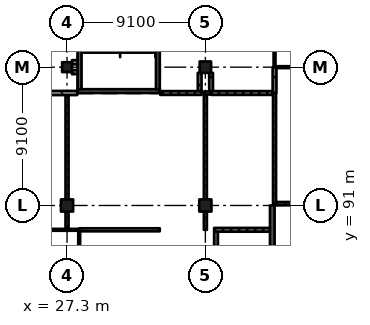
"""IFC4 building model, lengths in metres.
Left out: names, types, materials, properties, quantities, classifications, styles, units other than length and angle.
Written with IfcOpenShell. Run it as: python <this file> out.ifc"""

import sys

from ifc_helpers import new_model, si_unit, direction, frame, frame_2d, origin, origin_2d, place, context, subcontext, project, spatial, rectangle, extrude, element, fill, save


model = new_model("IFC4")
c1 = context("Model", 3, precision=1e-05, world=origin(), true_north=direction((0.0, 1.0)))
c2 = subcontext(c1, "Body", "Model", "MODEL_VIEW")
j1 = project(units=[si_unit("LENGTHUNIT", "METRE"), si_unit("PLANEANGLEUNIT", "RADIAN")], contexts=[c1])
p1 = place(None, origin())
s1 = spatial("IfcSite", under=j1, at=p1, CompositionType="ELEMENT")
p2 = place(p1, origin())
s2 = spatial("IfcBuilding", under=s1, at=p2, CompositionType="ELEMENT")
p3 = place(p2, frame((0.0, 0.0, 10.92)))
s3 = spatial("IfcBuildingStorey", under=s2, at=p3, CompositionType="ELEMENT", Elevation=10.92)
p4 = place(p3, frame((27.3, 91.0, 0.0), z_axis=(0.0, 0.0, 1.0), x_axis=(1.0, 0.0, 0.0)))
e1 = element("IfcColumn", 1, at=p4, inside=s3, PredefinedType="COLUMN", context=c2, shape_type="SweptSolid", body=[
    extrude(rectangle(XDim=0.8, YDim=0.8, at=origin_2d()), origin(), (0.0, 0.0, 1.0), 4.55),
])
p5 = place(p3, frame((27.3, 100.1, 0.0), z_axis=(0.0, 0.0, 1.0), x_axis=(1.0, 0.0, 0.0)))
e2 = element("IfcColumn", 2, at=p5, inside=s3, PredefinedType="COLUMN", context=c2, shape_type="SweptSolid", body=[
    extrude(rectangle(XDim=0.65, YDim=0.65, at=origin_2d()), origin(), (0.0, 0.0, 1.0), 4.55),
])
p6 = place(p3, frame((36.4, 91.0, 0.0), z_axis=(0.0, 0.0, 1.0), x_axis=(1.0, 0.0, 0.0)))
e3 = element("IfcColumn", 3, at=p6, inside=s3, PredefinedType="COLUMN", context=c2, shape_type="SweptSolid", body=[
    extrude(rectangle(XDim=0.8, YDim=0.8, at=origin_2d()), origin(), (0.0, 0.0, 1.0), 4.55),
])
p7 = place(p3, frame((36.4, 100.1, 0.0), z_axis=(0.0, 0.0, 1.0), x_axis=(1.0, 0.0, 0.0)))
e4 = element("IfcColumn", 4, at=p7, inside=s3, PredefinedType="COLUMN", context=c2, shape_type="SweptSolid", body=[
    extrude(rectangle(XDim=0.75, YDim=0.75, at=origin_2d()), origin(), (0.0, 0.0, 1.0), 4.55),
])
p8 = place(p3, frame((40.8, 68.25, 0.0), z_axis=(0.0, 0.0, 1.0), x_axis=(0.0, 1.0, 0.0)))
e5 = element("IfcWall", 5, at=p8, inside=s3, PredefinedType="SHEAR", context=c2, shape_type="SweptSolid", body=[
    extrude(rectangle(XDim=22.75, YDim=0.3, at=frame_2d((11.375, 0.0))), origin(), (0.0, 0.0, 1.0), 4.55),
])
p9 = place(p3, frame((33.4, 98.525, 0.0), z_axis=(0.0, 0.0, 1.0), x_axis=(-1.0, 0.0, 0.0)))
e6 = element("IfcWall", 6, at=p9, inside=s3, PredefinedType="SHEAR", context=c2, shape_type="SweptSolid", body=[
    extrude(rectangle(XDim=5.4, YDim=0.25, at=frame_2d((2.7, 0.0))), origin(), (0.0, 0.0, 1.0), 4.55),
])
p10 = place(p9, frame((1.5, 0.0, 0.0)))
e7 = element("IfcOpeningElement", 7, at=p10, cuts=e6, PredefinedType="OPENING", context=c2, shape_type="SweptSolid", body=[
    extrude(rectangle(XDim=2.4, YDim=2.1, at=frame_2d((1.2, 1.05))), frame((0.0, 0.135, 0.0), z_axis=(0.0, -1.0, 0.0), x_axis=(1.0, 0.0, 0.0)), (0.0, 0.0, 1.0), 0.27),
])
for number, where, z_axis, x_axis in (
    (8, (28.125, 108.25, 0.0), (0.0, 0.0, 1.0), (0.0, -1.0, 0.0)),
    (9, (33.275, 108.25, 0.0), (0.0, 0.0, 1.0), (0.0, -1.0, 0.0)),
):
    element("IfcWall", number, at=place(p3, frame(where, z_axis=z_axis, x_axis=x_axis)), inside=s3, PredefinedType="SHEAR", context=c2, shape_type="SweptSolid", body=[
        extrude(rectangle(XDim=9.6, YDim=0.25, at=frame_2d((4.8, 0.0))), origin(), (0.0, 0.0, 1.0), 4.55),
    ])
p11 = place(p3, frame((24.33, 98.4, 0.0), z_axis=(0.0, 0.0, 1.0), x_axis=(1.0, 0.0, 0.0)))
e10 = element("IfcWall", 10, at=p11, inside=s3, PredefinedType="SOLIDWALL", context=c2, shape_type="SweptSolid", body=[
    extrude(rectangle(XDim=3.64, YDim=0.275, at=frame_2d((1.82, 0.0))), origin(), (0.0, 0.0, 1.0), 4.25),
])
p12 = place(p11, frame((0.85, 0.0, 0.0)))
e11 = element("IfcOpeningElement", 11, at=p12, cuts=e10, PredefinedType="OPENING", context=c2, shape_type="SweptSolid", body=[
    extrude(rectangle(XDim=1.2, YDim=2.4, at=frame_2d((0.6, 1.2))), frame((0.0, 0.147, 0.0), z_axis=(0.0, -1.0, 0.0), x_axis=(1.0, 0.0, 0.0)), (0.0, 0.0, 1.0), 0.295),
])
p13 = place(p3, frame((24.3, 89.4, 0.0), z_axis=(0.0, 0.0, 1.0), x_axis=(1.0, 0.0, 0.0)))
e12 = element("IfcWall", 12, at=p13, inside=s3, PredefinedType="PARTITIONING", context=c2, shape_type="SweptSolid", body=[
    extrude(rectangle(XDim=3.8, YDim=0.125, at=frame_2d((1.9, 0.0))), origin(), (0.0, 0.0, 1.0), 4.25),
])
p14 = place(p13, frame((1.05, 0.0, 0.0)))
e13 = element("IfcOpeningElement", 13, at=p14, cuts=e12, PredefinedType="OPENING", context=c2, shape_type="SweptSolid", body=[
    extrude(rectangle(XDim=0.9, YDim=2.1, at=frame_2d((0.45, 1.05))), frame((0.0, 0.073, 0.0), z_axis=(0.0, -1.0, 0.0), x_axis=(1.0, 0.0, 0.0)), (0.0, 0.0, 1.0), 0.145),
])
p15 = place(p3, frame((27.3, 90.6, 0.0), z_axis=(0.0, 0.0, 1.0), x_axis=(0.0, -1.0, 0.0)))
e14 = element("IfcWall", 14, at=p15, inside=s3, PredefinedType="PARTITIONING", context=c2, shape_type="SweptSolid", body=[
    extrude(rectangle(XDim=1.138, YDim=0.2, at=frame_2d((0.569, 0.0))), origin(), (0.0, 0.0, 1.0), 3.55),
])
p16 = place(p3, frame((27.3, 98.262, 0.0), z_axis=(0.0, 0.0, 1.0), x_axis=(0.0, -1.0, 0.0)))
e15 = element("IfcWall", 15, at=p16, inside=s3, PredefinedType="PARTITIONING", context=c2, shape_type="SweptSolid", body=[
    extrude(rectangle(XDim=6.863, YDim=0.2, at=frame_2d((3.431, 0.0))), origin(), (0.0, 0.0, 1.0), 3.55),
])
p17 = place(p16, frame((0.85, 0.0, 0.0)))
e16 = element("IfcOpeningElement", 16, at=p17, cuts=e15, PredefinedType="OPENING", context=c2, shape_type="SweptSolid", body=[
    extrude(rectangle(XDim=1.8, YDim=2.4, at=frame_2d((0.9, 1.2))), frame((0.0, 0.11, 0.0), z_axis=(0.0, -1.0, 0.0), x_axis=(1.0, 0.0, 0.0)), (0.0, 0.0, 1.0), 0.22),
])
p18 = place(p16, frame((4.25, 0.0, 0.0)))
e17 = element("IfcOpeningElement", 17, at=p18, cuts=e15, PredefinedType="OPENING", context=c2, shape_type="SweptSolid", body=[
    extrude(rectangle(XDim=1.8, YDim=2.4, at=frame_2d((0.9, 1.2))), frame((0.0, 0.11, 0.0), z_axis=(0.0, -1.0, 0.0), x_axis=(1.0, 0.0, 0.0)), (0.0, 0.0, 1.0), 0.22),
])
for number, where, z_axis, x_axis in (
    (18, (27.625, 99.775, 0.0), (0.0, 0.0, 1.0), (1.0, 0.0, 0.0)),
    (19, (27.97, 100.425, 0.0), (0.0, 0.0, 1.0), (-1.0, 0.0, 0.0)),
):
    element("IfcWall", number, at=place(p3, frame(where, z_axis=z_axis, x_axis=x_axis)), inside=s3, PredefinedType="SOLIDWALL", context=c2, shape_type="SweptSolid", body=[
        extrude(rectangle(XDim=0.345, YDim=0.275, at=frame_2d((0.172, 0.0))), origin(), (0.0, 0.0, 1.0), 4.25),
    ])
p19 = place(p3, frame((28.1, 89.3, 0.0), z_axis=(0.0, 0.0, 1.0), x_axis=(0.0, -1.0, 0.0)))
e20 = element("IfcWall", 20, at=p19, inside=s3, PredefinedType="PARTITIONING", context=c2, shape_type="SweptSolid", body=[
    extrude(rectangle(XDim=2.87, YDim=0.125, at=frame_2d((1.435, 0.0))), origin(), (0.0, 0.0, 1.0), 4.25),
])
p20 = place(p3, frame((33.4, 89.4, 0.0), z_axis=(0.0, 0.0, 1.0), x_axis=(-1.0, 0.0, 0.0)))
e21 = element("IfcWall", 21, at=p20, inside=s3, PredefinedType="PARTITIONING", context=c2, shape_type="SweptSolid", body=[
    extrude(rectangle(XDim=5.3, YDim=0.2, at=frame_2d((2.65, 0.0))), origin(), (0.0, 0.0, 1.0), 4.25),
])
p21 = place(p20, frame((1.75, 0.0, 0.0)))
e22 = element("IfcOpeningElement", 22, at=p21, cuts=e21, PredefinedType="OPENING", context=c2, shape_type="SweptSolid", body=[
    extrude(rectangle(XDim=1.8, YDim=2.4, at=frame_2d((0.9, 1.2))), frame((0.0, 0.11, 0.0), z_axis=(0.0, -1.0, 0.0), x_axis=(1.0, 0.0, 0.0)), (0.0, 0.0, 1.0), 0.22),
])
p22 = place(p3, frame((33.43, 98.4, 0.0), z_axis=(0.0, 0.0, 1.0), x_axis=(1.0, 0.0, 0.0)))
e23 = element("IfcWall", 23, at=p22, inside=s3, PredefinedType="SOLIDWALL", context=c2, shape_type="SweptSolid", body=[
    extrude(rectangle(XDim=2.72, YDim=0.25, at=frame_2d((1.36, 0.0))), origin(), (0.0, 0.0, 1.0), 4.25),
])
p23 = place(p3, frame((36.025, 98.525, 0.0), z_axis=(0.0, 0.0, 1.0), x_axis=(0.0, 1.0, 0.0)))
e24 = element("IfcWall", 24, at=p23, inside=s3, PredefinedType="SOLIDWALL", context=c2, shape_type="SweptSolid", body=[
    extrude(rectangle(XDim=1.2, YDim=0.25, at=frame_2d((0.6, 0.0))), origin(), (0.0, 0.0, 1.0), 4.25),
])
p24 = place(p3, frame((36.4, 90.6, 0.0), z_axis=(0.0, 0.0, 1.0), x_axis=(0.0, -1.0, 0.0)))
e25 = element("IfcWall", 25, at=p24, inside=s3, PredefinedType="PARTITIONING", context=c2, shape_type="SweptSolid", body=[
    extrude(rectangle(XDim=1.2, YDim=0.2, at=frame_2d((0.6, 0.0))), origin(), (0.0, 0.0, 1.0), 3.55),
])
p25 = place(p3, frame((36.4, 98.3, 0.0), z_axis=(0.0, 0.0, 1.0), x_axis=(0.0, -1.0, 0.0)))
e26 = element("IfcWall", 26, at=p25, inside=s3, PredefinedType="PARTITIONING", context=c2, shape_type="SweptSolid", body=[
    extrude(rectangle(XDim=6.9, YDim=0.2, at=frame_2d((3.45, 0.0))), origin(), (0.0, 0.0, 1.0), 3.55),
])
p26 = place(p25, frame((0.85, 0.0, 0.0)))
e27 = element("IfcOpeningElement", 27, at=p26, cuts=e26, PredefinedType="OPENING", context=c2, shape_type="SweptSolid", body=[
    extrude(rectangle(XDim=1.8, YDim=2.4, at=frame_2d((0.9, 1.2))), frame((0.0, 0.11, 0.0), z_axis=(0.0, -1.0, 0.0), x_axis=(1.0, 0.0, 0.0)), (0.0, 0.0, 1.0), 0.22),
])
p27 = place(p25, frame((4.25, 0.0, 0.0)))
e28 = element("IfcOpeningElement", 28, at=p27, cuts=e26, PredefinedType="OPENING", context=c2, shape_type="SweptSolid", body=[
    extrude(rectangle(XDim=1.8, YDim=2.4, at=frame_2d((0.9, 1.2))), frame((0.0, 0.11, 0.0), z_axis=(0.0, -1.0, 0.0), x_axis=(1.0, 0.0, 0.0)), (0.0, 0.0, 1.0), 0.22),
])
p28 = place(p3, frame((36.775, 98.4, 0.0), z_axis=(0.0, 0.0, 1.0), x_axis=(-1.0, 0.0, 0.0)))
e29 = element("IfcWall", 29, at=p28, inside=s3, PredefinedType="PARTITIONING", context=c2, shape_type="SweptSolid", body=[
    extrude(rectangle(XDim=0.475, YDim=0.2, at=frame_2d((0.237, 0.0))), origin(), (0.0, 0.0, 1.0), 4.25),
])
p29 = place(p3, frame((36.775, 98.4, 0.0), z_axis=(0.0, 0.0, 1.0), x_axis=(1.0, 0.0, 0.0)))
e30 = element("IfcWall", 30, at=p29, inside=s3, PredefinedType="SOLIDWALL", context=c2, shape_type="SweptSolid", body=[
    extrude(rectangle(XDim=4.05, YDim=0.25, at=frame_2d((2.025, 0.0))), origin(), (0.0, 0.0, 1.0), 4.25),
])
p30 = place(p29, frame((1.15, 0.0, 0.0)))
e31 = element("IfcOpeningElement", 31, at=p30, cuts=e30, PredefinedType="OPENING", context=c2, shape_type="SweptSolid", body=[
    extrude(rectangle(XDim=1.8, YDim=2.1, at=frame_2d((0.9, 1.05))), frame((0.0, 0.135, 0.0), z_axis=(0.0, -1.0, 0.0), x_axis=(1.0, 0.0, 0.0)), (0.0, 0.0, 1.0), 0.27),
])
p31 = place(p3, frame((36.775, 99.725, 0.0), z_axis=(0.0, 0.0, 1.0), x_axis=(0.0, -1.0, 0.0)))
e32 = element("IfcWall", 32, at=p31, inside=s3, PredefinedType="SOLIDWALL", context=c2, shape_type="SweptSolid", body=[
    extrude(rectangle(XDim=1.2, YDim=0.25, at=frame_2d((0.6, 0.0))), origin(), (0.0, 0.0, 1.0), 4.25),
])
p32 = place(p3, frame((37.1, 89.275, 0.0), z_axis=(0.0, 0.0, 1.0), x_axis=(0.0, -1.0, 0.0)))
e33 = element("IfcWall", 33, at=p32, inside=s3, PredefinedType="SOLIDWALL", context=c2, shape_type="SweptSolid", body=[
    extrude(rectangle(XDim=6.875, YDim=0.25, at=frame_2d((3.438, 0.0))), origin(), (0.0, 0.0, 1.0), 4.25),
])
p33 = place(p3, frame((40.65, 89.4, 0.0), z_axis=(0.0, 0.0, 1.0), x_axis=(-1.0, 0.0, 0.0)))
e34 = element("IfcWall", 34, at=p33, inside=s3, PredefinedType="SOLIDWALL", context=c2, shape_type="SweptSolid", body=[
    extrude(rectangle(XDim=3.675, YDim=0.25, at=frame_2d((1.837, 0.0))), origin(), (0.0, 0.0, 1.0), 4.25),
])
p34 = place(p33, frame((1.35, 0.0, 0.0)))
e35 = element("IfcOpeningElement", 35, at=p34, cuts=e34, PredefinedType="OPENING", context=c2, shape_type="SweptSolid", body=[
    extrude(rectangle(XDim=1.0, YDim=2.1, at=frame_2d((0.5, 1.05))), frame((0.0, 0.135, 0.0), z_axis=(0.0, -1.0, 0.0), x_axis=(1.0, 0.0, 0.0)), (0.0, 0.0, 1.0), 0.27),
])
p35 = place(p3, frame((40.95, 98.4, 0.0), z_axis=(0.0, 0.0, 1.0), x_axis=(0.0, -1.0, 0.0)))
e36 = element("IfcWall", 36, at=p35, inside=s3, PredefinedType="PARTITIONING", context=c2, shape_type="SweptSolid", body=[
    extrude(rectangle(XDim=7.37, YDim=0.2, at=frame_2d((3.685, 0.0))), origin(), (0.0, 0.0, 1.0), 4.25),
])
p36 = place(p35, frame((0.95, 0.0, 0.0)))
e37 = element("IfcOpeningElement", 37, at=p36, cuts=e36, PredefinedType="OPENING", context=c2, shape_type="SweptSolid", body=[
    extrude(rectangle(XDim=1.8, YDim=2.4, at=frame_2d((0.9, 1.2))), frame((0.0, 0.11, 0.0), z_axis=(0.0, -1.0, 0.0), x_axis=(1.0, 0.0, 0.0)), (0.0, 0.0, 1.0), 0.22),
])
p37 = place(p35, frame((4.65, 0.0, 0.0)))
e38 = element("IfcOpeningElement", 38, at=p37, cuts=e36, PredefinedType="OPENING", context=c2, shape_type="SweptSolid", body=[
    extrude(rectangle(XDim=1.8, YDim=2.4, at=frame_2d((0.9, 1.2))), frame((0.0, 0.11, 0.0), z_axis=(0.0, -1.0, 0.0), x_axis=(1.0, 0.0, 0.0)), (0.0, 0.0, 1.0), 0.22),
])
p38 = place(p3, frame((40.95, 100.1, 0.0), z_axis=(0.0, 0.0, 1.0), x_axis=(0.0, -1.0, 0.0)))
e39 = element("IfcWall", 39, at=p38, inside=s3, PredefinedType="SOLIDWALL", context=c2, shape_type="SweptSolid", body=[
    extrude(rectangle(XDim=1.7, YDim=0.25, at=frame_2d((0.85, 0.0))), origin(), (0.0, 0.0, 1.0), 4.25),
])
p39 = place(p3, frame((40.95, 100.1, 0.0), z_axis=(0.0, 0.0, 1.0), x_axis=(0.0, 1.0, 0.0)))
e40 = element("IfcWall", 40, at=p39, inside=s3, PredefinedType="PARTITIONING", context=c2, shape_type="SweptSolid", body=[
    extrude(rectangle(XDim=9.07, YDim=0.125, at=frame_2d((4.535, 0.0))), origin(), (0.0, 0.0, 1.0), 4.25),
])
p40 = place(p3, frame((41.075, 100.1, 0.0), z_axis=(0.0, 0.0, 1.0), x_axis=(1.0, 0.0, 0.0)))
e41 = element("IfcWall", 41, at=p40, inside=s3, PredefinedType="PARTITIONING", context=c2, shape_type="SweptSolid", body=[
    extrude(rectangle(XDim=4.425, YDim=0.125, at=frame_2d((2.212, 0.0))), origin(), (0.0, 0.0, 1.0), 3.55),
])
p41 = place(p40, frame((1.75, 0.0, 0.0)))
e42 = element("IfcOpeningElement", 42, at=p41, cuts=e41, PredefinedType="OPENING", context=c2, shape_type="SweptSolid", body=[
    extrude(rectangle(XDim=1.0, YDim=2.1, at=frame_2d((0.5, 1.05))), frame((0.0, 0.073, 0.0), z_axis=(0.0, -1.0, 0.0), x_axis=(1.0, 0.0, 0.0)), (0.0, 0.0, 1.0), 0.145),
])
p42 = place(p3, frame((45.2, 91.13, 0.0), z_axis=(0.0, 0.0, 1.0), x_axis=(-1.0, 0.0, 0.0)))
e43 = element("IfcWall", 43, at=p42, inside=s3, PredefinedType="PARTITIONING", context=c2, shape_type="SweptSolid", body=[
    extrude(rectangle(XDim=4.15, YDim=0.2, at=frame_2d((2.075, 0.0))), origin(), (0.0, 0.0, 1.0), 3.55),
])
p43 = place(p42, frame((1.075, 0.0, 1.1)))
e44 = element("IfcOpeningElement", 44, at=p43, cuts=e43, PredefinedType="OPENING", context=c2, shape_type="SweptSolid", body=[
    extrude(rectangle(XDim=2.0, YDim=2.0, at=frame_2d((1.0, 1.0))), frame((0.0, 0.11, 0.0), z_axis=(0.0, -1.0, 0.0), x_axis=(1.0, 0.0, 0.0)), (0.0, 0.0, 1.0), 0.22),
])
p44 = place(p34, origin())
e45 = element("IfcDoor", 45, at=p44, inside=s3, OperationType="SINGLE_SWING_LEFT", PredefinedType="DOOR", context=c2, shape_type="SweptSolid", body=[
    extrude(rectangle(XDim=1.0, YDim=2.1, at=frame_2d((0.5, 1.05))), frame((0.0, 0.025, 0.0), z_axis=(0.0, -1.0, 0.0), x_axis=(1.0, 0.0, 0.0)), (0.0, 0.0, 1.0), 0.05),
])
fill(e35, e45)
p45 = place(p12, origin())
e46 = element("IfcDoor", 46, at=p45, inside=s3, OperationType="SINGLE_SWING_RIGHT", PredefinedType="DOOR", context=c2, shape_type="SweptSolid", body=[
    extrude(rectangle(XDim=1.2, YDim=2.4, at=frame_2d((0.6, 1.2))), frame((0.0, 0.025, 0.0), z_axis=(0.0, -1.0, 0.0), x_axis=(1.0, 0.0, 0.0)), (0.0, 0.0, 1.0), 0.05),
])
fill(e11, e46)
p46 = place(p30, origin())
e47 = element("IfcDoor", 47, at=p46, inside=s3, OperationType="DOUBLE_DOOR_SINGLE_SWING", PredefinedType="DOOR", context=c2, shape_type="SweptSolid", body=[
    extrude(rectangle(XDim=1.8, YDim=2.1, at=frame_2d((0.9, 1.05))), frame((0.0, 0.025, 0.0), z_axis=(0.0, -1.0, 0.0), x_axis=(1.0, 0.0, 0.0)), (0.0, 0.0, 1.0), 0.05),
])
fill(e31, e47)
p47 = place(p17, origin())
e48 = element("IfcDoor", 48, at=p47, inside=s3, OperationType="DOUBLE_DOOR_SINGLE_SWING", PredefinedType="DOOR", context=c2, shape_type="SweptSolid", body=[
    extrude(rectangle(XDim=1.8, YDim=2.4, at=frame_2d((0.9, 1.2))), frame((0.0, 0.025, 0.0), z_axis=(0.0, -1.0, 0.0), x_axis=(1.0, 0.0, 0.0)), (0.0, 0.0, 1.0), 0.05),
])
fill(e16, e48)
p48 = place(p18, origin())
e49 = element("IfcDoor", 49, at=p48, inside=s3, OperationType="DOUBLE_DOOR_SINGLE_SWING", PredefinedType="DOOR", context=c2, shape_type="SweptSolid", body=[
    extrude(rectangle(XDim=1.8, YDim=2.4, at=frame_2d((0.9, 1.2))), frame((0.0, 0.025, 0.0), z_axis=(0.0, -1.0, 0.0), x_axis=(1.0, 0.0, 0.0)), (0.0, 0.0, 1.0), 0.05),
])
fill(e17, e49)
p49 = place(p26, origin())
e50 = element("IfcDoor", 50, at=p49, inside=s3, OperationType="DOUBLE_DOOR_SINGLE_SWING", PredefinedType="DOOR", context=c2, shape_type="SweptSolid", body=[
    extrude(rectangle(XDim=1.8, YDim=2.4, at=frame_2d((0.9, 1.2))), frame((0.0, 0.025, 0.0), z_axis=(0.0, -1.0, 0.0), x_axis=(1.0, 0.0, 0.0)), (0.0, 0.0, 1.0), 0.05),
])
fill(e27, e50)
p50 = place(p27, origin())
e51 = element("IfcDoor", 51, at=p50, inside=s3, OperationType="DOUBLE_DOOR_SINGLE_SWING", PredefinedType="DOOR", context=c2, shape_type="SweptSolid", body=[
    extrude(rectangle(XDim=1.8, YDim=2.4, at=frame_2d((0.9, 1.2))), frame((0.0, 0.025, 0.0), z_axis=(0.0, -1.0, 0.0), x_axis=(1.0, 0.0, 0.0)), (0.0, 0.0, 1.0), 0.05),
])
fill(e28, e51)
p51 = place(p21, origin())
e52 = element("IfcDoor", 52, at=p51, inside=s3, OperationType="DOUBLE_DOOR_SINGLE_SWING", PredefinedType="DOOR", context=c2, shape_type="SweptSolid", body=[
    extrude(rectangle(XDim=1.8, YDim=2.4, at=frame_2d((0.9, 1.2))), frame((0.0, 0.025, 0.0), z_axis=(0.0, -1.0, 0.0), x_axis=(1.0, 0.0, 0.0)), (0.0, 0.0, 1.0), 0.05),
])
fill(e22, e52)
p52 = place(p36, origin())
e53 = element("IfcDoor", 53, at=p52, inside=s3, OperationType="DOUBLE_DOOR_SINGLE_SWING", PredefinedType="DOOR", context=c2, shape_type="SweptSolid", body=[
    extrude(rectangle(XDim=1.8, YDim=2.4, at=frame_2d((0.9, 1.2))), frame((0.0, 0.025, 0.0), z_axis=(0.0, -1.0, 0.0), x_axis=(1.0, 0.0, 0.0)), (0.0, 0.0, 1.0), 0.05),
])
fill(e37, e53)
p53 = place(p37, origin())
e54 = element("IfcDoor", 54, at=p53, inside=s3, OperationType="DOUBLE_DOOR_SINGLE_SWING", PredefinedType="DOOR", context=c2, shape_type="SweptSolid", body=[
    extrude(rectangle(XDim=1.8, YDim=2.4, at=frame_2d((0.9, 1.2))), frame((0.0, 0.025, 0.0), z_axis=(0.0, -1.0, 0.0), x_axis=(1.0, 0.0, 0.0)), (0.0, 0.0, 1.0), 0.05),
])
fill(e38, e54)
p54 = place(p10, origin())
e55 = element("IfcDoor", 55, at=p54, inside=s3, OperationType="DOUBLE_DOOR_SINGLE_SWING", PredefinedType="DOOR", context=c2, shape_type="SweptSolid", body=[
    extrude(rectangle(XDim=2.4, YDim=2.1, at=frame_2d((1.2, 1.05))), frame((0.0, 0.025, 0.0), z_axis=(0.0, -1.0, 0.0), x_axis=(1.0, 0.0, 0.0)), (0.0, 0.0, 1.0), 0.05),
])
fill(e7, e55)
save(model, sys.argv[1])
